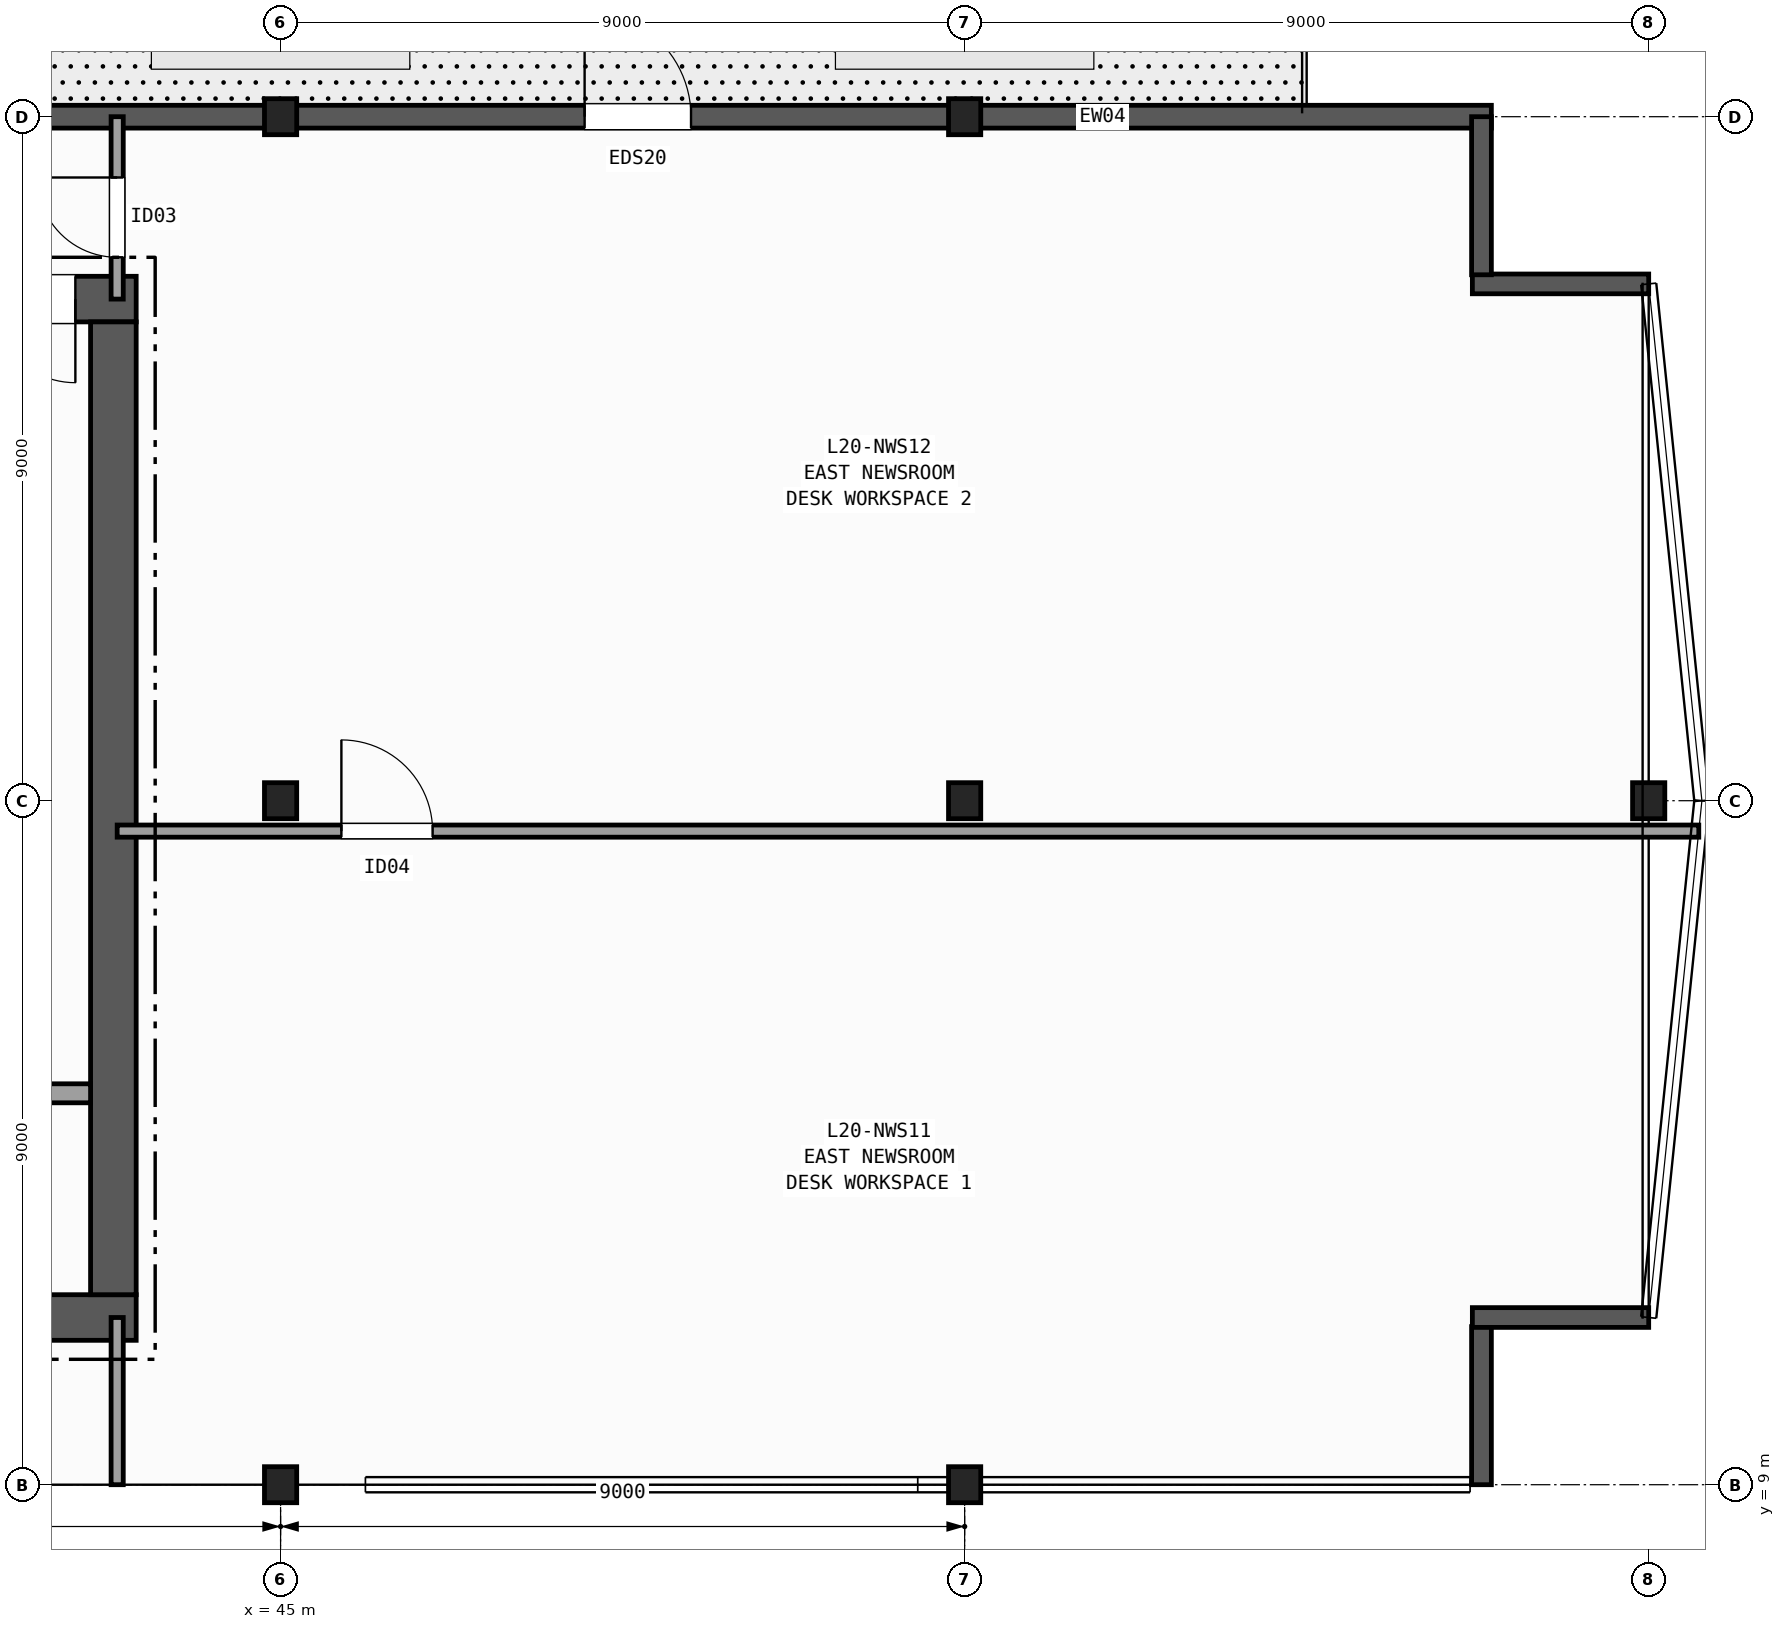
"""IFC4 building model, lengths in metres.
Left out: names, types, materials, properties, quantities, classifications, styles, units other than length and angle.
Written with IfcOpenShell. Run it as: python <this file> out.ifc"""

import sys

from ifc_helpers import new_model, si_unit, direction, frame, frame_2d, origin, origin_2d, place, context, subcontext, project, spatial, rectangle, i_section, extrude, element, fill, save


model = new_model("IFC4")
c1 = context("Model", 3, precision=1e-05, world=origin(), true_north=direction((0.0, 1.0)))
c2 = subcontext(c1, "Body", "Model", "MODEL_VIEW")
j1 = project(units=[si_unit("LENGTHUNIT", "METRE"), si_unit("PLANEANGLEUNIT", "RADIAN")], contexts=[c1])
p1 = place(None, origin())
s1 = spatial("IfcSite", under=j1, at=p1, CompositionType="ELEMENT")
p2 = place(p1, origin())
s2 = spatial("IfcBuilding", under=s1, at=p2, CompositionType="ELEMENT")
p3 = place(p2, frame((0.0, 0.0, 84.1)))
s3 = spatial("IfcBuildingStorey", under=s2, at=p3, CompositionType="ELEMENT", Elevation=84.1)
for number, where, z_axis, x_axis in (
    (1, (45.0, 9.0, 0.0), (0.0, 0.0, 1.0), (1.0, 0.0, 0.0)),
    (2, (45.0, 18.0, 0.0), (0.0, 0.0, 1.0), (1.0, 0.0, 0.0)),
    (3, (45.0, 27.0, 0.0), (0.0, 0.0, 1.0), (1.0, 0.0, 0.0)),
    (4, (54.0, 9.0, 0.0), (0.0, 0.0, 1.0), (1.0, 0.0, 0.0)),
    (5, (54.0, 18.0, 0.0), (0.0, 0.0, 1.0), (1.0, 0.0, 0.0)),
    (6, (54.0, 27.0, 0.0), (0.0, 0.0, 1.0), (1.0, 0.0, 0.0)),
    (7, (63.0, 18.0, 0.0), (0.0, 0.0, 1.0), (1.0, 0.0, 0.0)),
):
    element("IfcColumn", number, at=place(p3, frame(where, z_axis=z_axis, x_axis=x_axis)), inside=s3, PredefinedType="COLUMN", context=c2, shape_type="SweptSolid", body=[
        extrude(i_section(OverallWidth=0.424, OverallDepth=0.474, WebThickness=0.048, FlangeThickness=0.077, FilletRadius=0.015, at=origin_2d()), origin(), (0.0, 0.0, 1.0), 5.0),
    ])
p4 = place(p3, frame((38.5, 27.0, 0.0), z_axis=(0.0, 0.0, 1.0), x_axis=(1.0, 0.0, 0.0)))
e8 = element("IfcWall", 8, at=p4, inside=s3, PredefinedType="SOLIDWALL", context=c2, shape_type="SweptSolid", body=[
    extrude(rectangle(XDim=22.43, YDim=0.3, at=frame_2d((11.215, 0.0))), origin(), (0.0, 0.0, 1.0), 4.72),
])
p5 = place(p4, frame((10.5, 0.0, 0.0)))
e9 = element("IfcOpeningElement", 9, at=p5, cuts=e8, PredefinedType="OPENING", context=c2, shape_type="SweptSolid", body=[
    extrude(rectangle(XDim=1.4, YDim=2.25, at=frame_2d((0.7, 1.125))), frame((0.0, 0.16, 0.0), z_axis=(0.0, -1.0, 0.0), x_axis=(1.0, 0.0, 0.0)), (0.0, 0.0, 1.0), 0.32),
])
p6 = place(p3, frame((60.8, 9.0, 0.0), z_axis=(0.0, 0.0, 1.0), x_axis=(0.0, 1.0, 0.0)))
e10 = element("IfcWall", 10, at=p6, inside=s3, PredefinedType="SOLIDWALL", context=c2, shape_type="SweptSolid", body=[
    extrude(rectangle(XDim=2.08, YDim=0.26, at=frame_2d((1.04, 0.0))), origin(), (0.0, 0.0, 1.0), 4.72),
])
for number, where, z_axis, x_axis in (
    (11, (60.68, 11.2, 0.0), (0.0, 0.0, 1.0), (1.0, 0.0, 0.0)),
    (12, (63.0, 24.8, 0.0), (0.0, 0.0, 1.0), (-1.0, 0.0, 0.0)),
):
    element("IfcWall", number, at=place(p3, frame(where, z_axis=z_axis, x_axis=x_axis)), inside=s3, PredefinedType="SOLIDWALL", context=c2, shape_type="SweptSolid", body=[
        extrude(rectangle(XDim=2.32, YDim=0.26, at=frame_2d((1.16, 0.0))), origin(), (0.0, 0.0, 1.0), 4.72),
    ])
p7 = place(p3, frame((60.8, 24.92, 0.0), z_axis=(0.0, 0.0, 1.0), x_axis=(0.0, 1.0, 0.0)))
e13 = element("IfcWall", 13, at=p7, inside=s3, PredefinedType="SOLIDWALL", context=c2, shape_type="SweptSolid", body=[
    extrude(rectangle(XDim=2.08, YDim=0.26, at=frame_2d((1.04, 0.0))), origin(), (0.0, 0.0, 1.0), 4.72),
])
p8 = place(p3, frame((29.1, 11.2, 0.0), z_axis=(0.0, 0.0, 1.0), x_axis=(1.0, 0.0, 0.0)))
e14 = element("IfcWall", 14, at=p8, inside=s3, PredefinedType="SHEAR", context=c2, shape_type="SweptSolid", body=[
    extrude(rectangle(XDim=14.0, YDim=0.6, at=frame_2d((7.0, 0.0))), origin(), (0.0, 0.0, 1.0), 4.72),
])
p9 = place(p3, frame((43.1, 24.6, 0.0), z_axis=(0.0, 0.0, 1.0), x_axis=(-1.0, 0.0, 0.0)))
e15 = element("IfcWall", 15, at=p9, inside=s3, PredefinedType="SHEAR", context=c2, shape_type="SweptSolid", body=[
    extrude(rectangle(XDim=14.0, YDim=0.6, at=frame_2d((7.0, 0.0))), origin(), (0.0, 0.0, 1.0), 4.72),
])
p10 = place(p9, frame((0.8, 0.0, 0.0)))
e16 = element("IfcOpeningElement", 16, at=p10, cuts=e15, PredefinedType="OPENING", context=c2, shape_type="SweptSolid", body=[
    extrude(rectangle(XDim=1.1, YDim=2.15, at=frame_2d((0.55, 1.075))), frame((0.0, 0.31, 0.0), z_axis=(0.0, -1.0, 0.0), x_axis=(1.0, 0.0, 0.0)), (0.0, 0.0, 1.0), 0.62),
])
p11 = place(p9, frame((2.3, 0.0, 0.0)))
e17 = element("IfcOpeningElement", 17, at=p11, cuts=e15, PredefinedType="OPENING", context=c2, shape_type="SweptSolid", body=[
    extrude(rectangle(XDim=0.9, YDim=2.1, at=frame_2d((0.45, 1.05))), frame((0.0, 0.31, 0.0), z_axis=(0.0, -1.0, 0.0), x_axis=(1.0, 0.0, 0.0)), (0.0, 0.0, 1.0), 0.62),
])
p12 = place(p9, frame((3.6, 0.0, 0.0)))
e18 = element("IfcOpeningElement", 18, at=p12, cuts=e15, PredefinedType="OPENING", context=c2, shape_type="SweptSolid", body=[
    extrude(rectangle(XDim=0.9, YDim=2.1, at=frame_2d((0.45, 1.05))), frame((0.0, 0.31, 0.0), z_axis=(0.0, -1.0, 0.0), x_axis=(1.0, 0.0, 0.0)), (0.0, 0.0, 1.0), 0.62),
])
p13 = place(p9, frame((4.95, 0.0, 0.0)))
e19 = element("IfcOpeningElement", 19, at=p13, cuts=e15, PredefinedType="OPENING", context=c2, shape_type="SweptSolid", body=[
    extrude(rectangle(XDim=0.9, YDim=2.1, at=frame_2d((0.45, 1.05))), frame((0.0, 0.31, 0.0), z_axis=(0.0, -1.0, 0.0), x_axis=(1.0, 0.0, 0.0)), (0.0, 0.0, 1.0), 0.62),
])
p14 = place(p3, frame((42.8, 11.5, 0.0), z_axis=(0.0, 0.0, 1.0), x_axis=(0.0, 1.0, 0.0)))
e20 = element("IfcWall", 20, at=p14, inside=s3, PredefinedType="SHEAR", context=c2, shape_type="SweptSolid", body=[
    extrude(rectangle(XDim=12.8, YDim=0.6, at=frame_2d((6.4, 0.0))), origin(), (0.0, 0.0, 1.0), 4.72),
])
p15 = place(p3, frame((33.07, 14.15, 0.0), z_axis=(0.0, 0.0, 1.0), x_axis=(1.0, 0.0, 0.0)))
e21 = element("IfcWall", 21, at=p15, inside=s3, PredefinedType="PARTITIONING", context=c2, shape_type="SweptSolid", body=[
    extrude(rectangle(XDim=9.43, YDim=0.25, at=frame_2d((4.715, 0.0))), origin(), (0.0, 0.0, 1.0), 4.72),
])
p16 = place(p15, frame((0.755, 0.0, 0.0)))
e22 = element("IfcOpeningElement", 22, at=p16, cuts=e21, PredefinedType="OPENING", context=c2, shape_type="SweptSolid", body=[
    extrude(rectangle(XDim=1.15, YDim=2.15, at=frame_2d((0.575, 1.075))), frame((0.0, 0.135, 0.0), z_axis=(0.0, -1.0, 0.0), x_axis=(1.0, 0.0, 0.0)), (0.0, 0.0, 1.0), 0.27),
])
p17 = place(p15, frame((3.355, 0.0, 0.0)))
e23 = element("IfcOpeningElement", 23, at=p17, cuts=e21, PredefinedType="OPENING", context=c2, shape_type="SweptSolid", body=[
    extrude(rectangle(XDim=1.15, YDim=2.15, at=frame_2d((0.575, 1.075))), frame((0.0, 0.135, 0.0), z_axis=(0.0, -1.0, 0.0), x_axis=(1.0, 0.0, 0.0)), (0.0, 0.0, 1.0), 0.27),
])
p18 = place(p3, frame((42.85, 9.0, 0.0), z_axis=(0.0, 0.0, 1.0), x_axis=(0.0, 1.0, 0.0)))
e24 = element("IfcWall", 24, at=p18, inside=s3, PredefinedType="PARTITIONING", context=c2, shape_type="SweptSolid", body=[
    extrude(rectangle(XDim=2.2, YDim=0.16, at=frame_2d((1.1, 0.0))), origin(), (0.0, 0.0, 1.0), 3.927),
])
p19 = place(p3, frame((42.85, 24.6, 0.0), z_axis=(0.0, 0.0, 1.0), x_axis=(0.0, 1.0, 0.0)))
e25 = element("IfcWall", 25, at=p19, inside=s3, PredefinedType="PARTITIONING", context=c2, shape_type="SweptSolid", body=[
    extrude(rectangle(XDim=2.4, YDim=0.16, at=frame_2d((1.2, 0.0))), origin(), (0.0, 0.0, 1.0), 3.927),
])
p20 = place(p19, frame((0.55, 0.0, 0.0)))
e26 = element("IfcOpeningElement", 26, at=p20, cuts=e25, PredefinedType="OPENING", context=c2, shape_type="SweptSolid", body=[
    extrude(rectangle(XDim=1.05, YDim=2.15, at=frame_2d((0.525, 1.075))), frame((0.0, 0.09, 0.0), z_axis=(0.0, -1.0, 0.0), x_axis=(1.0, 0.0, 0.0)), (0.0, 0.0, 1.0), 0.18),
])
p21 = place(p3, frame((42.85, 17.6, 0.0), z_axis=(0.0, 0.0, 1.0), x_axis=(1.0, 0.0, 0.0)))
e27 = element("IfcWall", 27, at=p21, inside=s3, PredefinedType="PARTITIONING", context=c2, shape_type="SweptSolid", body=[
    extrude(rectangle(XDim=20.809, YDim=0.16, at=frame_2d((10.404, 0.0))), origin(), (0.0, 0.0, 1.0), 4.092),
])
p22 = place(p21, frame((2.95, 0.0, 0.0)))
e28 = element("IfcOpeningElement", 28, at=p22, cuts=e27, PredefinedType="OPENING", context=c2, shape_type="SweptSolid", body=[
    extrude(rectangle(XDim=1.2, YDim=2.15, at=frame_2d((0.6, 1.075))), frame((0.0, 0.09, 0.0), z_axis=(0.0, -1.0, 0.0), x_axis=(1.0, 0.0, 0.0)), (0.0, 0.0, 1.0), 0.18),
])
p23 = place(p5, origin())
e29 = element("IfcDoor", 29, at=p23, inside=s3, OperationType="SINGLE_SWING_LEFT", PredefinedType="DOOR", context=c2, shape_type="SweptSolid", body=[
    extrude(rectangle(XDim=1.4, YDim=2.25, at=frame_2d((0.7, 1.125))), frame((0.0, 0.025, 0.0), z_axis=(0.0, -1.0, 0.0), x_axis=(1.0, 0.0, 0.0)), (0.0, 0.0, 1.0), 0.05),
])
fill(e9, e29)
p24 = place(p10, origin())
e30 = element("IfcDoor", 30, at=p24, inside=s3, OperationType="SINGLE_SWING_LEFT", PredefinedType="DOOR", context=c2, shape_type="SweptSolid", body=[
    extrude(rectangle(XDim=1.1, YDim=2.15, at=frame_2d((0.55, 1.075))), frame((0.0, 0.025, 0.0), z_axis=(0.0, -1.0, 0.0), x_axis=(1.0, 0.0, 0.0)), (0.0, 0.0, 1.0), 0.05),
])
fill(e16, e30)
p25 = place(p20, origin())
e31 = element("IfcDoor", 31, at=p25, inside=s3, OperationType="SINGLE_SWING_RIGHT", PredefinedType="DOOR", context=c2, shape_type="SweptSolid", body=[
    extrude(rectangle(XDim=1.05, YDim=2.15, at=frame_2d((0.525, 1.075))), frame((0.0, 0.025, 0.0), z_axis=(0.0, -1.0, 0.0), x_axis=(1.0, 0.0, 0.0)), (0.0, 0.0, 1.0), 0.05),
])
fill(e26, e31)
p26 = place(p22, origin())
e32 = element("IfcDoor", 32, at=p26, inside=s3, OperationType="SINGLE_SWING_LEFT", PredefinedType="DOOR", context=c2, shape_type="SweptSolid", body=[
    extrude(rectangle(XDim=1.2, YDim=2.15, at=frame_2d((0.6, 1.075))), frame((0.0, 0.025, 0.0), z_axis=(0.0, -1.0, 0.0), x_axis=(1.0, 0.0, 0.0)), (0.0, 0.0, 1.0), 0.05),
])
fill(e28, e32)
save(model, sys.argv[1])
